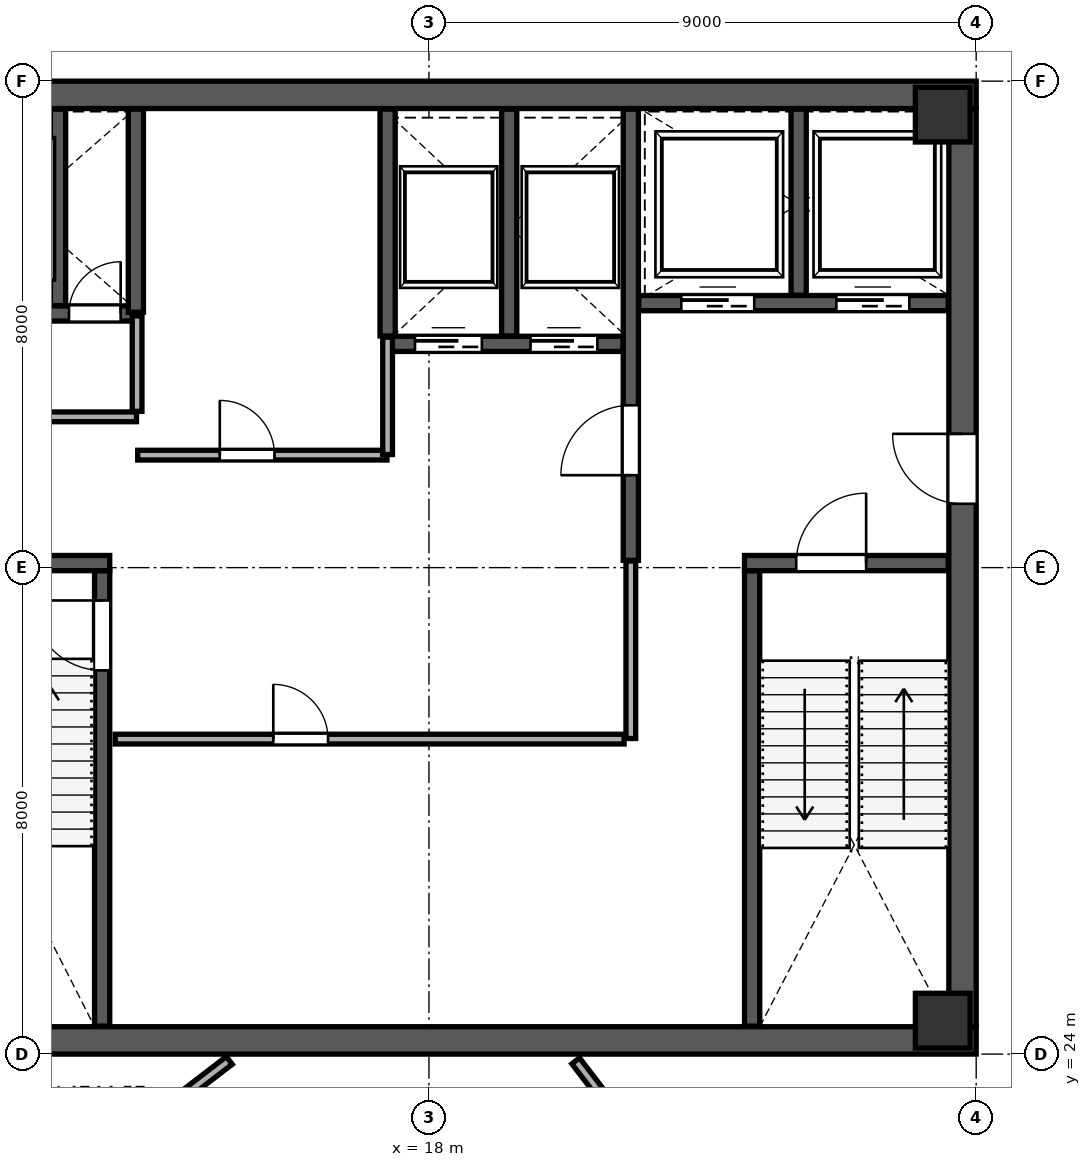
"""IFC4 building model, lengths in metres.
Left out: names, types, materials, properties, quantities, classifications, styles, units other than length and angle.
Written with IfcOpenShell. Run it as: python <this file> out.ifc"""

import sys

from ifc_helpers import new_model, si_unit, direction, frame, frame_2d, origin, origin_2d, place, context, subcontext, project, spatial, rectangle, extrude, source, transform, mapped, element, fill, save


model = new_model("IFC4")
c1 = context("Model", 3, precision=1e-05, world=origin(), true_north=direction((0.0, 1.0)))
c2 = subcontext(c1, "Body", "Model", "MODEL_VIEW")
j1 = project(units=[si_unit("LENGTHUNIT", "METRE"), si_unit("PLANEANGLEUNIT", "RADIAN")], contexts=[c1])
p1 = place(None, origin())
s1 = spatial("IfcSite", under=j1, at=p1, CompositionType="ELEMENT")
p2 = place(p1, origin())
s2 = spatial("IfcBuilding", under=s1, at=p2, CompositionType="ELEMENT")
p3 = place(p2, frame((0.0, 0.0, 279.4)))
s3 = spatial("IfcBuildingStorey", under=s2, at=p3, CompositionType="ELEMENT", Elevation=279.4)
m1 = source(origin(), c2, "Body", "SweptSolid", [
    extrude(rectangle(XDim=0.9, YDim=0.9, at=origin_2d()), origin(), (0.0, 0.0, 1.0), 4.199),
])
for number, where, z_axis, x_axis in (
    (1, (26.45, 24.55, 0.001), (0.0, 0.0, 1.0), (1.0, 0.0, 0.0)),
    (2, (26.45, 39.45, 0.001), (0.0, 0.0, 1.0), (1.0, 0.0, 0.0)),
):
    element("IfcColumn", number, at=place(p3, frame(where, z_axis=z_axis, x_axis=x_axis)), inside=s3, PredefinedType="COLUMN", context=c2, shape_type="MappedRepresentation", body=[
        mapped(m1, transform((0.0, 0.0, 0.0), scale=1.0)),
    ])
p4 = place(p3, frame((26.775, 24.45, 0.0), z_axis=(0.0, 0.0, 1.0), x_axis=(0.0, 1.0, 0.0)))
e3 = element("IfcWall", 3, at=p4, inside=s3, PredefinedType="SHEAR", context=c2, shape_type="SweptSolid", body=[
    extrude(rectangle(XDim=15.1, YDim=0.45, at=frame_2d((7.55, 0.0))), origin(), (0.0, 0.0, 1.0), 3.96),
])
p5 = place(p4, frame((8.6, 0.0, 0.0)))
e4 = element("IfcOpeningElement", 4, at=p5, cuts=e3, PredefinedType="OPENING", context=c2, shape_type="SweptSolid", body=[
    extrude(rectangle(XDim=1.15, YDim=2.2, at=frame_2d((0.575, 1.1))), frame((0.0, 0.235, 0.0), z_axis=(0.0, -1.0, 0.0), x_axis=(1.0, 0.0, 0.0)), (0.0, 0.0, 1.0), 0.47),
])
for number, where, z_axis, x_axis in (
    (5, (9.0, 24.225, 0.0), (0.0, 0.0, 1.0), (1.0, 0.0, 0.0)),
    (6, (9.0, 39.775, 0.0), (0.0, 0.0, 1.0), (1.0, 0.0, 0.0)),
):
    element("IfcWall", number, at=place(p3, frame(where, z_axis=z_axis, x_axis=x_axis)), inside=s3, PredefinedType="SHEAR", context=c2, shape_type="SweptSolid", body=[
        extrude(rectangle(XDim=18.0, YDim=0.45, at=frame_2d((9.0, 0.0))), origin(), (0.0, 0.0, 1.0), 3.96),
    ])
p6 = place(p3, frame((12.625, 24.46, 0.0), z_axis=(0.0, 0.0, 1.0), x_axis=(0.0, 1.0, 0.0)))
e7 = element("IfcWall", 7, at=p6, inside=s3, PredefinedType="SHEAR", context=c2, shape_type="SweptSolid", body=[
    extrude(rectangle(XDim=7.49, YDim=0.25, at=frame_2d((3.745, 0.0))), origin(), (0.0, 0.0, 1.0), 3.96),
])
p7 = place(p6, frame((5.85, 0.0, 0.0)))
e8 = element("IfcOpeningElement", 8, at=p7, cuts=e7, PredefinedType="OPENING", context=c2, shape_type="SweptSolid", body=[
    extrude(rectangle(XDim=1.15, YDim=2.2, at=frame_2d((0.575, 1.1))), frame((0.0, 0.135, 0.0), z_axis=(0.0, -1.0, 0.0), x_axis=(1.0, 0.0, 0.0)), (0.0, 0.0, 1.0), 0.27),
])
p8 = place(p3, frame((9.46, 32.075, 0.0), z_axis=(0.0, 0.0, 1.0), x_axis=(1.0, 0.0, 0.0)))
e9 = element("IfcWall", 9, at=p8, inside=s3, PredefinedType="SHEAR", context=c2, shape_type="SweptSolid", body=[
    extrude(rectangle(XDim=3.29, YDim=0.25, at=frame_2d((1.645, 0.0))), origin(), (0.0, 0.0, 1.0), 3.96),
])
p9 = place(p3, frame((23.315, 24.46, 0.0), z_axis=(0.0, 0.0, 1.0), x_axis=(0.0, 1.0, 0.0)))
e10 = element("IfcWall", 10, at=p9, inside=s3, PredefinedType="SHEAR", context=c2, shape_type="SweptSolid", body=[
    extrude(rectangle(XDim=7.49, YDim=0.25, at=frame_2d((3.745, 0.0))), origin(), (0.0, 0.0, 1.0), 3.96),
])
p10 = place(p3, frame((23.19, 32.075, 0.0), z_axis=(0.0, 0.0, 1.0), x_axis=(1.0, 0.0, 0.0)))
e11 = element("IfcWall", 11, at=p10, inside=s3, PredefinedType="SHEAR", context=c2, shape_type="SweptSolid", body=[
    extrude(rectangle(XDim=3.35, YDim=0.25, at=frame_2d((1.675, 0.0))), origin(), (0.0, 0.0, 1.0), 3.96),
])
p11 = place(p10, frame((0.85, 0.0, 0.0)))
e12 = element("IfcOpeningElement", 12, at=p11, cuts=e11, PredefinedType="OPENING", context=c2, shape_type="SweptSolid", body=[
    extrude(rectangle(XDim=1.15, YDim=2.2, at=frame_2d((0.575, 1.1))), frame((0.0, 0.135, 0.0), z_axis=(0.0, -1.0, 0.0), x_axis=(1.0, 0.0, 0.0)), (0.0, 0.0, 1.0), 0.27),
])
p12 = place(p3, frame((21.32, 32.12, 0.0), z_axis=(0.0, 0.0, 1.0), x_axis=(0.0, 1.0, 0.0)))
e13 = element("IfcWall", 13, at=p12, inside=s3, PredefinedType="SHEAR", context=c2, shape_type="SweptSolid", body=[
    extrude(rectangle(XDim=7.42, YDim=0.25, at=frame_2d((3.71, 0.0))), origin(), (0.0, 0.0, 1.0), 3.96),
])
p13 = place(p12, frame((1.4, 0.0, 0.0)))
e14 = element("IfcOpeningElement", 14, at=p13, cuts=e13, PredefinedType="OPENING", context=c2, shape_type="SweptSolid", body=[
    extrude(rectangle(XDim=1.15, YDim=2.2, at=frame_2d((0.575, 1.1))), frame((0.0, 0.135, 0.0), z_axis=(0.0, -1.0, 0.0), x_axis=(1.0, 0.0, 0.0)), (0.0, 0.0, 1.0), 0.27),
])
p14 = place(p3, frame((9.46, 36.18, 0.0), z_axis=(0.0, 0.0, 1.0), x_axis=(1.0, 0.0, 0.0)))
e15 = element("IfcWall", 15, at=p14, inside=s3, PredefinedType="SHEAR", context=c2, shape_type="SweptSolid", body=[
    extrude(rectangle(XDim=3.79, YDim=0.25, at=frame_2d((1.895, 0.0))), origin(), (0.0, 0.0, 1.0), 3.96),
])
p15 = place(p14, frame((2.62, 0.0, 0.0)))
e16 = element("IfcOpeningElement", 16, at=p15, cuts=e15, PredefinedType="OPENING", context=c2, shape_type="SweptSolid", body=[
    extrude(rectangle(XDim=0.85, YDim=2.1, at=frame_2d((0.425, 1.05))), frame((0.0, 0.135, 0.0), z_axis=(0.0, -1.0, 0.0), x_axis=(1.0, 0.0, 0.0)), (0.0, 0.0, 1.0), 0.27),
])
p16 = place(p14, frame((0.85, 0.0, 0.0)))
e17 = element("IfcOpeningElement", 17, at=p16, cuts=e15, PredefinedType="OPENING", context=c2, shape_type="SweptSolid", body=[
    extrude(rectangle(XDim=1.3, YDim=2.25, at=frame_2d((0.65, 1.125))), frame((0.0, 0.135, 0.0), z_axis=(0.0, -1.0, 0.0), x_axis=(1.0, 0.0, 0.0)), (0.0, 0.0, 1.0), 0.27),
])
p17 = place(p3, frame((11.9, 36.31, 0.0), z_axis=(0.0, 0.0, 1.0), x_axis=(0.0, 1.0, 0.0)))
e18 = element("IfcWall", 18, at=p17, inside=s3, PredefinedType="SHEAR", context=c2, shape_type="SweptSolid", body=[
    extrude(rectangle(XDim=3.23, YDim=0.25, at=frame_2d((1.615, 0.0))), origin(), (0.0, 0.0, 1.0), 3.96),
])
p18 = place(p3, frame((21.45, 36.35, 0.0), z_axis=(0.0, 0.0, 1.0), x_axis=(1.0, 0.0, 0.0)))
e19 = element("IfcWall", 19, at=p18, inside=s3, PredefinedType="SHEAR", context=c2, shape_type="SweptSolid", body=[
    extrude(rectangle(XDim=5.09, YDim=0.25, at=frame_2d((2.545, 0.0))), origin(), (0.0, 0.0, 1.0), 3.96),
])
p19 = place(p18, frame((0.7, 0.0, 0.0)))
e20 = element("IfcOpeningElement", 20, at=p19, cuts=e19, PredefinedType="OPENING", context=c2, shape_type="SweptSolid", body=[
    extrude(rectangle(XDim=1.2, YDim=2.2, at=frame_2d((0.6, 1.1))), frame((0.0, 0.135, 0.0), z_axis=(0.0, -1.0, 0.0), x_axis=(1.0, 0.0, 0.0)), (0.0, 0.0, 1.0), 0.27),
])
p20 = place(p18, frame((3.25, 0.0, 0.0)))
e21 = element("IfcOpeningElement", 21, at=p20, cuts=e19, PredefinedType="OPENING", context=c2, shape_type="SweptSolid", body=[
    extrude(rectangle(XDim=1.2, YDim=2.2, at=frame_2d((0.6, 1.1))), frame((0.0, 0.135, 0.0), z_axis=(0.0, -1.0, 0.0), x_axis=(1.0, 0.0, 0.0)), (0.0, 0.0, 1.0), 0.27),
])
p21 = place(p3, frame((24.08, 36.48, 0.0), z_axis=(0.0, 0.0, 1.0), x_axis=(0.0, 1.0, 0.0)))
e22 = element("IfcWall", 22, at=p21, inside=s3, PredefinedType="SHEAR", context=c2, shape_type="SweptSolid", body=[
    extrude(rectangle(XDim=3.06, YDim=0.25, at=frame_2d((1.53, 0.0))), origin(), (0.0, 0.0, 1.0), 3.96),
])
p22 = place(p3, frame((13.18, 36.2, 0.0), z_axis=(0.0, 0.0, 1.0), x_axis=(0.0, 1.0, 0.0)))
e23 = element("IfcWall", 23, at=p22, inside=s3, PredefinedType="SHEAR", context=c2, shape_type="SweptSolid", body=[
    extrude(rectangle(XDim=3.34, YDim=0.25, at=frame_2d((1.67, 0.0))), origin(), (0.0, 0.0, 1.0), 3.96),
])
p23 = place(p3, frame((17.32, 35.68, 0.0), z_axis=(0.0, 0.0, 1.0), x_axis=(1.0, 0.0, 0.0)))
e24 = element("IfcWall", 24, at=p23, inside=s3, PredefinedType="SHEAR", context=c2, shape_type="SweptSolid", body=[
    extrude(rectangle(XDim=3.87, YDim=0.25, at=frame_2d((1.935, 0.0))), origin(), (0.0, 0.0, 1.0), 3.96),
])
p24 = place(p23, frame((0.45, 0.0, 0.0)))
e25 = element("IfcOpeningElement", 25, at=p24, cuts=e24, PredefinedType="OPENING", context=c2, shape_type="SweptSolid", body=[
    extrude(rectangle(XDim=1.1, YDim=2.2, at=frame_2d((0.55, 1.1))), frame((0.0, 0.135, 0.0), z_axis=(0.0, -1.0, 0.0), x_axis=(1.0, 0.0, 0.0)), (0.0, 0.0, 1.0), 0.27),
])
p25 = place(p23, frame((2.35, 0.0, 0.0)))
e26 = element("IfcOpeningElement", 26, at=p25, cuts=e24, PredefinedType="OPENING", context=c2, shape_type="SweptSolid", body=[
    extrude(rectangle(XDim=1.1, YDim=2.2, at=frame_2d((0.55, 1.1))), frame((0.0, 0.135, 0.0), z_axis=(0.0, -1.0, 0.0), x_axis=(1.0, 0.0, 0.0)), (0.0, 0.0, 1.0), 0.27),
])
for number, where, z_axis, x_axis in (
    (27, (17.32, 35.81, 0.0), (0.0, 0.0, 1.0), (0.0, 1.0, 0.0)),
    (28, (19.32, 35.81, 0.0), (0.0, 0.0, 1.0), (0.0, 1.0, 0.0)),
):
    element("IfcWall", number, at=place(p3, frame(where, z_axis=z_axis, x_axis=x_axis)), inside=s3, PredefinedType="SHEAR", context=c2, shape_type="SweptSolid", body=[
        extrude(rectangle(XDim=3.73, YDim=0.25, at=frame_2d((1.865, 0.0))), origin(), (0.0, 0.0, 1.0), 3.96),
    ])
p26 = place(p3, frame((9.49, 34.48, 0.0), z_axis=(0.0, 0.0, 1.0), x_axis=(1.0, 0.0, 0.0)))
e29 = element("IfcWall", 29, at=p26, inside=s3, PredefinedType="PARTITIONING", context=c2, shape_type="SweptSolid", body=[
    extrude(rectangle(XDim=3.7, YDim=0.16, at=frame_2d((1.85, 0.0))), origin(), (0.0, 0.0, 1.0), 3.96),
])
p27 = place(p26, frame((1.15, 0.0, 0.0)))
e30 = element("IfcOpeningElement", 30, at=p27, cuts=e29, PredefinedType="OPENING", context=c2, shape_type="SweptSolid", body=[
    extrude(rectangle(XDim=0.9, YDim=2.15, at=frame_2d((0.45, 1.075))), frame((0.0, 0.09, 0.0), z_axis=(0.0, -1.0, 0.0), x_axis=(1.0, 0.0, 0.0)), (0.0, 0.0, 1.0), 0.18),
])
p28 = place(p3, frame((13.2, 34.57, 0.0), z_axis=(0.0, 0.0, 1.0), x_axis=(0.0, 1.0, 0.0)))
e31 = element("IfcWall", 31, at=p28, inside=s3, PredefinedType="PARTITIONING", context=c2, shape_type="SweptSolid", body=[
    extrude(rectangle(XDim=1.57, YDim=0.16, at=frame_2d((0.785, 0.0))), origin(), (0.0, 0.0, 1.0), 3.96),
])
p29 = place(p3, frame((13.21, 33.85, 0.0), z_axis=(0.0, 0.0, 1.0), x_axis=(1.0, 0.0, 0.0)))
e32 = element("IfcWall", 32, at=p29, inside=s3, PredefinedType="PARTITIONING", context=c2, shape_type="SweptSolid", body=[
    extrude(rectangle(XDim=4.1, YDim=0.16, at=frame_2d((2.05, 0.0))), origin(), (0.0, 0.0, 1.0), 3.96),
])
p30 = place(p29, frame((1.35, 0.0, 0.0)))
e33 = element("IfcOpeningElement", 33, at=p30, cuts=e32, PredefinedType="OPENING", context=c2, shape_type="SweptSolid", body=[
    extrude(rectangle(XDim=0.9, YDim=2.15, at=frame_2d((0.45, 1.075))), frame((0.0, 0.09, 0.0), z_axis=(0.0, -1.0, 0.0), x_axis=(1.0, 0.0, 0.0)), (0.0, 0.0, 1.0), 0.18),
])
p31 = place(p3, frame((17.32, 33.86, 0.0), z_axis=(0.0, 0.0, 1.0), x_axis=(0.0, 1.0, 0.0)))
e34 = element("IfcWall", 34, at=p31, inside=s3, PredefinedType="PARTITIONING", context=c2, shape_type="SweptSolid", body=[
    extrude(rectangle(XDim=1.93, YDim=0.16, at=frame_2d((0.965, 0.0))), origin(), (0.0, 0.0, 1.0), 3.96),
])
p32 = place(p3, frame((12.84, 29.18, 0.0), z_axis=(0.0, 0.0, 1.0), x_axis=(1.0, 0.0, 0.0)))
e35 = element("IfcWall", 35, at=p32, inside=s3, PredefinedType="PARTITIONING", context=c2, shape_type="SweptSolid", body=[
    extrude(rectangle(XDim=8.37, YDim=0.16, at=frame_2d((4.185, 0.0))), origin(), (0.0, 0.0, 1.0), 3.96),
])
p33 = place(p32, frame((2.6, 0.0, 0.0)))
e36 = element("IfcOpeningElement", 36, at=p33, cuts=e35, PredefinedType="OPENING", context=c2, shape_type="SweptSolid", body=[
    extrude(rectangle(XDim=0.9, YDim=2.15, at=frame_2d((0.45, 1.075))), frame((0.0, 0.09, 0.0), z_axis=(0.0, -1.0, 0.0), x_axis=(1.0, 0.0, 0.0)), (0.0, 0.0, 1.0), 0.18),
])
p34 = place(p3, frame((21.32, 29.19, 0.0), z_axis=(0.0, 0.0, 1.0), x_axis=(0.0, 1.0, 0.0)))
e37 = element("IfcWall", 37, at=p34, inside=s3, PredefinedType="PARTITIONING", context=c2, shape_type="SweptSolid", body=[
    extrude(rectangle(XDim=2.92, YDim=0.16, at=frame_2d((1.46, 0.0))), origin(), (0.0, 0.0, 1.0), 3.96),
])
p35 = place(p3, frame((10.952, 21.007, 0.0), z_axis=(0.0, 0.0, 1.0), x_axis=(0.793369431695, 0.608740457709, 0.0)))
e38 = element("IfcWall", 38, at=p35, inside=s3, PredefinedType="PARTITIONING", context=c2, shape_type="SweptSolid", body=[
    extrude(rectangle(XDim=4.745, YDim=0.16, at=frame_2d((2.372, 0.0))), origin(), (0.0, 0.0, 1.0), 3.96),
])
p36 = place(p3, frame((20.414, 23.888, 0.0), z_axis=(0.0, 0.0, 1.0), x_axis=(0.608740736079, -0.793369218106, 0.0)))
e39 = element("IfcWall", 39, at=p36, inside=s3, PredefinedType="PARTITIONING", context=c2, shape_type="SweptSolid", body=[
    extrude(rectangle(XDim=5.585, YDim=0.16, at=frame_2d((2.793, 0.0))), origin(), (0.0, 0.0, 1.0), 3.96),
])
p37 = place(p3, frame((20.518, 50.922, 0.0), z_axis=(0.0, 0.0, 1.0), x_axis=(0.608759693778, -0.793354671778, 0.0)))
e40 = element("IfcWall", 40, at=p37, inside=s3, PredefinedType="PARTITIONING", context=c2, shape_type="SweptSolid", body=[
    extrude(rectangle(XDim=26.97, YDim=0.135, at=frame_2d((13.485, 0.0))), origin(), (0.0, 0.0, 1.0), 3.96),
])
p38 = place(p37, frame((5.4, 0.0, 0.0)))
e41 = element("IfcOpeningElement", 41, at=p38, cuts=e40, PredefinedType="OPENING", context=c2, shape_type="SweptSolid", body=[
    extrude(rectangle(XDim=0.95, YDim=2.15, at=frame_2d((0.475, 1.075))), frame((0.0, 0.078, 0.0), z_axis=(0.0, -1.0, 0.0), x_axis=(1.0, 0.0, 0.0)), (0.0, 0.0, 1.0), 0.155),
])
p39 = place(p3, frame((1.519, 35.764, 0.0), z_axis=(0.0, 0.0, 1.0), x_axis=(0.793353184068, 0.608761632602, 0.0)))
e42 = element("IfcWall", 42, at=p39, inside=s3, PredefinedType="PARTITIONING", context=c2, shape_type="SweptSolid", body=[
    extrude(rectangle(XDim=27.572, YDim=0.1, at=frame_2d((13.786, 0.0))), origin(), (0.0, 0.0, 1.0), 3.96),
])
p40 = place(p3, frame((25.092, 20.387, 0.0), z_axis=(0.0, 0.0, 1.0), x_axis=(0.793357014217, 0.608756641025, 0.0)))
e43 = element("IfcWall", 43, at=p40, inside=s3, PredefinedType="PARTITIONING", context=c2, shape_type="SweptSolid", body=[
    extrude(rectangle(XDim=20.24, YDim=0.16, at=frame_2d((10.12, 0.0))), origin(), (0.0, 0.0, 1.0), 3.195),
])
m2 = source(origin(), c2, "Body", "SweptSolid", [
    extrude(rectangle(XDim=1.15, YDim=2.2, at=frame_2d((0.575, 1.1))), frame((0.0, 0.025, 0.0), z_axis=(0.0, -1.0, 0.0), x_axis=(1.0, 0.0, 0.0)), (0.0, 0.0, 1.0), 0.05),
])
p41 = place(p7, origin())
e44 = element("IfcDoor", 44, at=p41, inside=s3, OperationType="SINGLE_SWING_RIGHT", PredefinedType="DOOR", context=c2, shape_type="MappedRepresentation", body=[
    mapped(m2, transform((0.0, 0.0, 0.0), scale=1.0)),
])
fill(e8, e44)
m3 = source(origin(), c2, "Body", "SweptSolid", [
    extrude(rectangle(XDim=1.15, YDim=2.2, at=frame_2d((0.575, 1.1))), frame((0.0, 0.025, 0.0), z_axis=(0.0, -1.0, 0.0), x_axis=(1.0, 0.0, 0.0)), (0.0, 0.0, 1.0), 0.05),
])
p42 = place(p13, origin())
e45 = element("IfcDoor", 45, at=p42, inside=s3, OperationType="SINGLE_SWING_LEFT", PredefinedType="DOOR", context=c2, shape_type="MappedRepresentation", body=[
    mapped(m3, transform((0.0, 0.0, 0.0), scale=1.0)),
])
fill(e14, e45)
p43 = place(p11, origin())
e46 = element("IfcDoor", 46, at=p43, inside=s3, OperationType="SINGLE_SWING_RIGHT", PredefinedType="DOOR", context=c2, shape_type="MappedRepresentation", body=[
    mapped(m2, transform((0.0, 0.0, 0.0), scale=1.0)),
])
fill(e12, e46)
p44 = place(p5, origin())
e47 = element("IfcDoor", 47, at=p44, inside=s3, OperationType="SINGLE_SWING_RIGHT", PredefinedType="DOOR", context=c2, shape_type="MappedRepresentation", body=[
    mapped(m3, transform((0.0, 0.0, 0.0), scale=1.0)),
])
fill(e4, e47)
m4 = source(origin(), c2, "Body", "SweptSolid", [
    extrude(rectangle(XDim=0.85, YDim=2.1, at=frame_2d((0.425, 1.05))), frame((0.0, 0.025, 0.0), z_axis=(0.0, -1.0, 0.0), x_axis=(1.0, 0.0, 0.0)), (0.0, 0.0, 1.0), 0.05),
])
p45 = place(p15, origin())
e48 = element("IfcDoor", 48, at=p45, inside=s3, OperationType="SINGLE_SWING_RIGHT", PredefinedType="DOOR", context=c2, shape_type="MappedRepresentation", body=[
    mapped(m4, transform((0.0, 0.0, 0.0), scale=1.0)),
])
fill(e16, e48)
m5 = source(origin(), c2, "Body", "SweptSolid", [
    extrude(rectangle(XDim=1.1, YDim=2.2, at=frame_2d((0.55, 1.1))), frame((0.0, 0.025, 0.0), z_axis=(0.0, -1.0, 0.0), x_axis=(1.0, 0.0, 0.0)), (0.0, 0.0, 1.0), 0.05),
])
p46 = place(p24, origin())
e49 = element("IfcDoor", 49, at=p46, inside=s3, OperationType="SLIDING_TO_LEFT", PredefinedType="DOOR", context=c2, shape_type="MappedRepresentation", body=[
    mapped(m5, transform((0.0, 0.0, 0.0), scale=1.0)),
])
fill(e25, e49)
p47 = place(p25, origin())
e50 = element("IfcDoor", 50, at=p47, inside=s3, OperationType="SLIDING_TO_RIGHT", PredefinedType="DOOR", context=c2, shape_type="MappedRepresentation", body=[
    mapped(m5, transform((0.0, 0.0, 0.0), scale=1.0)),
])
fill(e26, e50)
m6 = source(origin(), c2, "Body", "SweptSolid", [
    extrude(rectangle(XDim=1.2, YDim=2.2, at=frame_2d((0.6, 1.1))), frame((0.0, 0.025, 0.0), z_axis=(0.0, -1.0, 0.0), x_axis=(1.0, 0.0, 0.0)), (0.0, 0.0, 1.0), 0.05),
])
p48 = place(p19, origin())
e51 = element("IfcDoor", 51, at=p48, inside=s3, OperationType="SLIDING_TO_LEFT", PredefinedType="DOOR", context=c2, shape_type="MappedRepresentation", body=[
    mapped(m6, transform((0.0, 0.0, 0.0), scale=1.0)),
])
fill(e20, e51)
p49 = place(p20, origin())
e52 = element("IfcDoor", 52, at=p49, inside=s3, OperationType="SLIDING_TO_RIGHT", PredefinedType="DOOR", context=c2, shape_type="MappedRepresentation", body=[
    mapped(m6, transform((0.0, 0.0, 0.0), scale=1.0)),
])
fill(e21, e52)
m7 = source(origin(), c2, "Body", "SweptSolid", [
    extrude(rectangle(XDim=0.9, YDim=2.15, at=frame_2d((0.45, 1.075))), frame((0.0, 0.025, 0.0), z_axis=(0.0, -1.0, 0.0), x_axis=(1.0, 0.0, 0.0)), (0.0, 0.0, 1.0), 0.05),
])
p50 = place(p30, origin())
e53 = element("IfcDoor", 53, at=p50, inside=s3, OperationType="SINGLE_SWING_LEFT", PredefinedType="DOOR", context=c2, shape_type="MappedRepresentation", body=[
    mapped(m7, transform((0.0, 0.0, 0.0), scale=1.0)),
])
fill(e33, e53)
p51 = place(p33, origin())
e54 = element("IfcDoor", 54, at=p51, inside=s3, OperationType="SINGLE_SWING_LEFT", PredefinedType="DOOR", context=c2, shape_type="MappedRepresentation", body=[
    mapped(m7, transform((0.0, 0.0, 0.0), scale=1.0)),
])
fill(e36, e54)
save(model, sys.argv[1])
